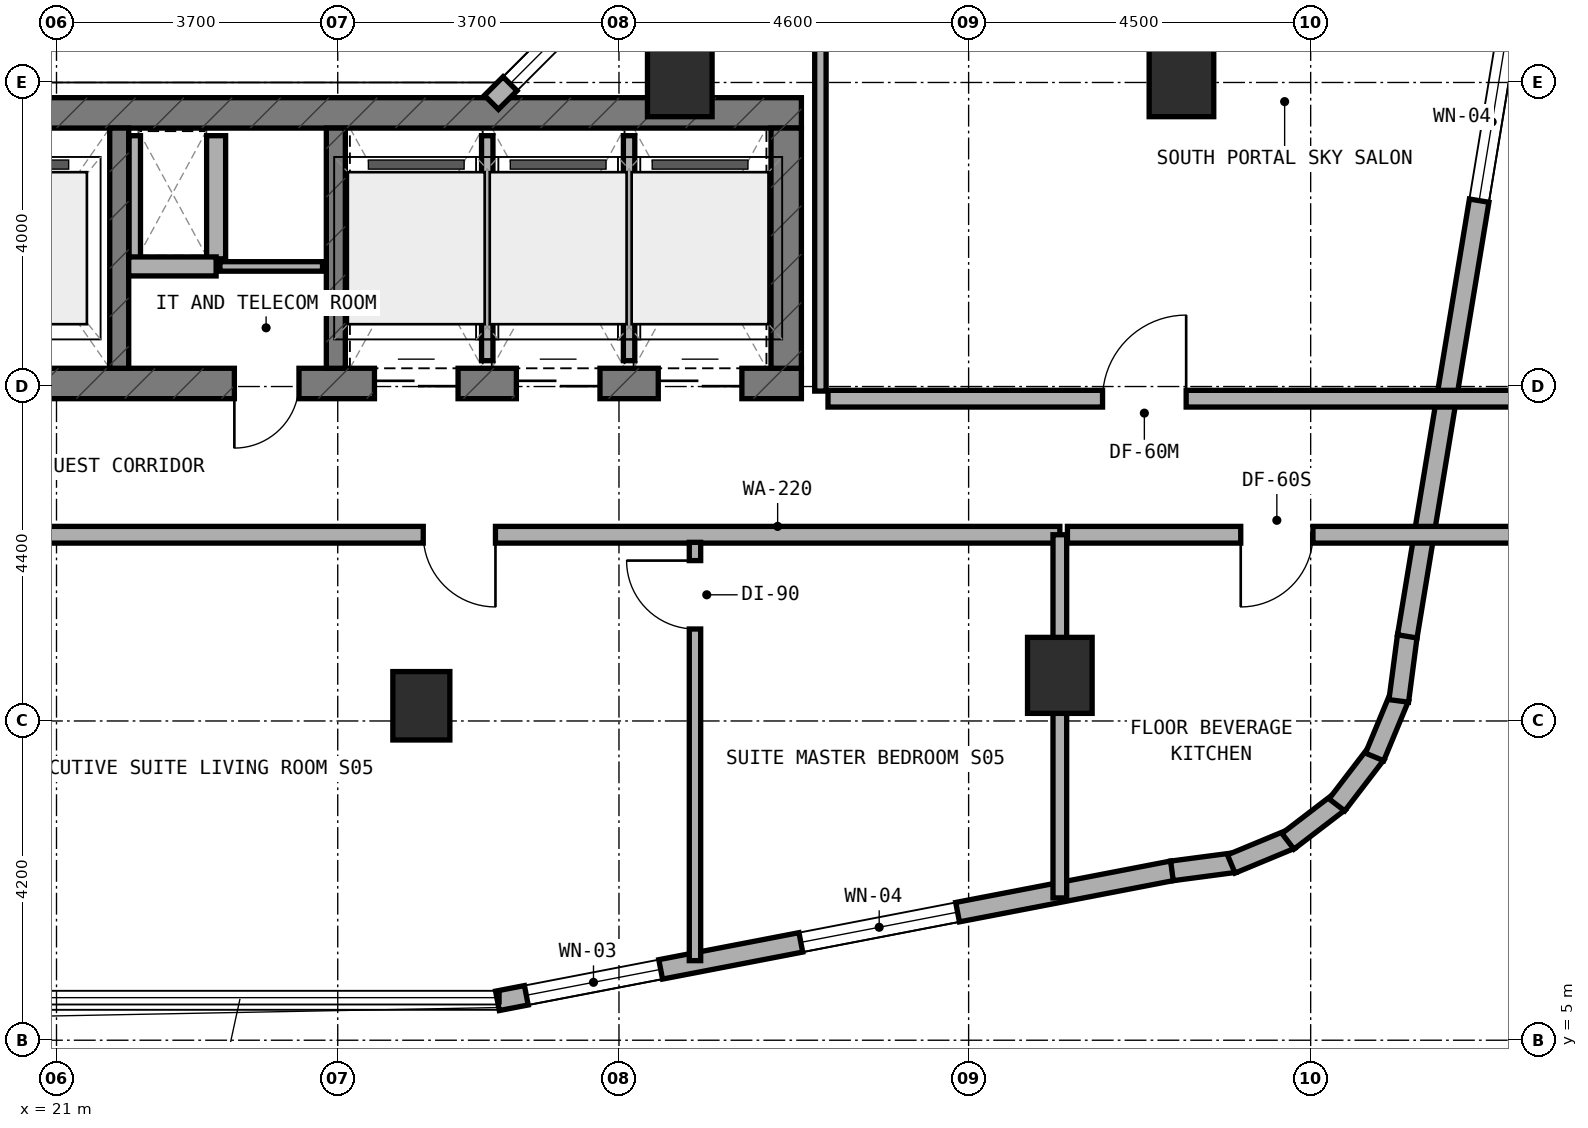
"""IFC4 building model, lengths in metres.
Left out: names, types, materials, properties, quantities, classifications, styles, units other than length and angle.
Written with IfcOpenShell. Run it as: python <this file> out.ifc"""

import sys

from ifc_helpers import new_model, si_unit, direction, frame, frame_2d, origin, origin_2d, place, context, subcontext, project, spatial, rectangle, extrude, element, fill, save


model = new_model("IFC4")
c1 = context("Model", 3, precision=1e-05, world=origin(), true_north=direction((0.0, 1.0)))
c2 = subcontext(c1, "Body", "Model", "MODEL_VIEW")
j1 = project(units=[si_unit("LENGTHUNIT", "METRE"), si_unit("PLANEANGLEUNIT", "RADIAN")], contexts=[c1])
p1 = place(None, origin())
s1 = spatial("IfcSite", under=j1, at=p1, CompositionType="ELEMENT")
p2 = place(p1, origin())
s2 = spatial("IfcBuilding", under=s1, at=p2, CompositionType="ELEMENT")
p3 = place(p2, frame((0.0, 0.0, 191.9)))
s3 = spatial("IfcBuildingStorey", under=s2, at=p3, CompositionType="ELEMENT", Elevation=191.9)
p4 = place(p3, frame((6.4, 13.64, 0.0), z_axis=(0.0, 0.0, 1.0), x_axis=(1.0, 0.0, 0.0)))
e1 = element("IfcWall", 1, at=p4, inside=s3, PredefinedType="SHEAR", context=c2, shape_type="SweptSolid", body=[
    extrude(rectangle(XDim=24.4, YDim=0.4, at=frame_2d((12.2, 0.0))), origin(), (0.0, 0.0, 1.0), 3.6),
])
p5 = place(p4, frame((9.15, 0.0, 0.0)))
e2 = element("IfcOpeningElement", 2, at=p5, cuts=e1, PredefinedType="OPENING", context=c2, shape_type="SweptSolid", body=[
    extrude(rectangle(XDim=1.2, YDim=2.15, at=frame_2d((0.6, 1.075))), frame((0.0, 0.21, 0.0), z_axis=(0.0, -1.0, 0.0), x_axis=(1.0, 0.0, 0.0)), (0.0, 0.0, 1.0), 0.42),
])
p6 = place(p4, frame((16.94, 0.0, 0.0)))
e3 = element("IfcOpeningElement", 3, at=p6, cuts=e1, PredefinedType="OPENING", context=c2, shape_type="SweptSolid", body=[
    extrude(rectangle(XDim=0.85, YDim=2.1, at=frame_2d((0.425, 1.05))), frame((0.0, 0.21, 0.0), z_axis=(0.0, -1.0, 0.0), x_axis=(1.0, 0.0, 0.0)), (0.0, 0.0, 1.0), 0.42),
])
p7 = place(p4, frame((18.783, 0.0, 0.0)))
e4 = element("IfcOpeningElement", 4, at=p7, cuts=e1, PredefinedType="OPENING", context=c2, shape_type="SweptSolid", body=[
    extrude(rectangle(XDim=1.1, YDim=2.15, at=frame_2d((0.55, 1.075))), frame((0.0, 0.21, 0.0), z_axis=(0.0, -1.0, 0.0), x_axis=(1.0, 0.0, 0.0)), (0.0, 0.0, 1.0), 0.42),
])
p8 = place(p4, frame((20.65, 0.0, 0.0)))
e5 = element("IfcOpeningElement", 5, at=p8, cuts=e1, PredefinedType="OPENING", context=c2, shape_type="SweptSolid", body=[
    extrude(rectangle(XDim=1.1, YDim=2.15, at=frame_2d((0.55, 1.075))), frame((0.0, 0.21, 0.0), z_axis=(0.0, -1.0, 0.0), x_axis=(1.0, 0.0, 0.0)), (0.0, 0.0, 1.0), 0.42),
])
p9 = place(p4, frame((22.517, 0.0, 0.0)))
e6 = element("IfcOpeningElement", 6, at=p9, cuts=e1, PredefinedType="OPENING", context=c2, shape_type="SweptSolid", body=[
    extrude(rectangle(XDim=1.1, YDim=2.15, at=frame_2d((0.55, 1.075))), frame((0.0, 0.21, 0.0), z_axis=(0.0, -1.0, 0.0), x_axis=(1.0, 0.0, 0.0)), (0.0, 0.0, 1.0), 0.42),
])
p10 = place(p3, frame((6.4, 17.2, 0.0), z_axis=(0.0, 0.0, 1.0), x_axis=(1.0, 0.0, 0.0)))
e7 = element("IfcWall", 7, at=p10, inside=s3, PredefinedType="SHEAR", context=c2, shape_type="SweptSolid", body=[
    extrude(rectangle(XDim=24.4, YDim=0.4, at=frame_2d((12.2, 0.0))), origin(), (0.0, 0.0, 1.0), 3.6),
])
p11 = place(p3, frame((30.6, 13.84, 0.0), z_axis=(0.0, 0.0, 1.0), x_axis=(0.0, 1.0, 0.0)))
e8 = element("IfcWall", 8, at=p11, inside=s3, PredefinedType="SHEAR", context=c2, shape_type="SweptSolid", body=[
    extrude(rectangle(XDim=3.16, YDim=0.4, at=frame_2d((1.58, 0.0))), origin(), (0.0, 0.0, 1.0), 3.6),
])
for number, where, z_axis, x_axis in (
    (9, (21.825, 13.84, 0.0), (0.0, 0.0, 1.0), (0.0, 1.0, 0.0)),
    (10, (24.675, 13.84, 0.0), (0.0, 0.0, 1.0), (0.0, 1.0, 0.0)),
):
    element("IfcWall", number, at=place(p3, frame(where, z_axis=z_axis, x_axis=x_axis)), inside=s3, PredefinedType="STANDARD", context=c2, shape_type="SweptSolid", body=[
        extrude(rectangle(XDim=3.16, YDim=0.25, at=frame_2d((1.58, 0.0))), origin(), (0.0, 0.0, 1.0), 3.32),
    ])
p12 = place(p3, frame((25.8, 9.4, 0.0), z_axis=(0.0, 0.0, 1.0), x_axis=(1.0, 0.0, 0.0)))
e11 = element("IfcColumn", 11, at=p12, inside=s3, PredefinedType="COLUMN", context=c2, shape_type="SweptSolid", body=[
    extrude(rectangle(XDim=0.75, YDim=0.9, at=origin_2d()), origin(), (0.0, 0.0, 1.0), 3.6),
])
for number, where, z_axis, x_axis in (
    (12, (34.2, 9.8, 0.0), (0.0, 0.0, 1.0), (1.0, 0.0, 0.0)),
    (13, (35.8, 17.65, 0.0), (0.0, 0.0, 1.0), (1.0, 0.0, 0.0)),
    (14, (29.2, 17.65, 0.0), (0.0, 0.0, 1.0), (1.0, 0.0, 0.0)),
):
    element("IfcColumn", number, at=place(p3, frame(where, z_axis=z_axis, x_axis=x_axis)), inside=s3, PredefinedType="COLUMN", context=c2, shape_type="SweptSolid", body=[
        extrude(rectangle(XDim=0.85, YDim=1.0, at=origin_2d()), origin(), (0.0, 0.0, 1.0), 3.6),
    ])
p13 = place(p3, frame((26.801, 5.518, 0.0), z_axis=(0.0, 0.0, 1.0), x_axis=(0.98192801022, 0.189254809039, 0.0)))
e15 = element("IfcWall", 15, at=p13, inside=s3, PredefinedType="STANDARD", context=c2, shape_type="SweptSolid", body=[
    extrude(rectangle(XDim=9.046, YDim=0.26, at=frame_2d((4.523, 0.0))), origin(), (0.0, 0.0, 1.0), 3.32),
])
p14 = place(p13, frame((0.387, 0.0, 0.85)))
e16 = element("IfcOpeningElement", 16, at=p14, cuts=e15, PredefinedType="OPENING", context=c2, shape_type="SweptSolid", body=[
    extrude(rectangle(XDim=1.8, YDim=1.5, at=frame_2d((0.9, 0.75))), frame((0.0, 0.14, 0.0), z_axis=(0.0, -1.0, 0.0), x_axis=(1.0, 0.0, 0.0)), (0.0, 0.0, 1.0), 0.28),
])
p15 = place(p13, frame((4.065, 0.0, 0.85)))
e17 = element("IfcOpeningElement", 17, at=p15, cuts=e15, PredefinedType="OPENING", context=c2, shape_type="SweptSolid", body=[
    extrude(rectangle(XDim=2.1, YDim=1.5, at=frame_2d((1.05, 0.75))), frame((0.0, 0.14, 0.0), z_axis=(0.0, -1.0, 0.0), x_axis=(1.0, 0.0, 0.0)), (0.0, 0.0, 1.0), 0.28),
])
p16 = place(p3, frame((35.675, 7.228, 0.0), z_axis=(0.0, 0.0, 1.0), x_axis=(0.99142134712, 0.130704676564, 0.0)))
e18 = element("IfcWall", 18, at=p16, inside=s3, PredefinedType="STANDARD", context=c2, shape_type="SweptSolid", body=[
    extrude(rectangle(XDim=0.833, YDim=0.26, at=frame_2d((0.417, 0.0))), origin(), (0.0, 0.0, 1.0), 3.32),
])
p17 = place(p3, frame((36.455, 7.319, 0.0), z_axis=(0.0, 0.0, 1.0), x_axis=(0.923712395518, 0.383086687796, 0.0)))
e19 = element("IfcWall", 19, at=p17, inside=s3, PredefinedType="STANDARD", context=c2, shape_type="SweptSolid", body=[
    extrude(rectangle(XDim=0.851, YDim=0.26, at=frame_2d((0.425, 0.0))), origin(), (0.0, 0.0, 1.0), 3.32),
])
for number, where, z_axis, x_axis in (
    (20, (37.201, 7.617, 0.0), (0.0, 0.0, 1.0), (0.794, 0.608, 0.0)),
    (21, (37.845, 8.096, 0.0), (0.0, 0.0, 1.0), (0.608, 0.794, 0.0)),
):
    element("IfcWall", number, at=place(p3, frame(where, z_axis=z_axis, x_axis=x_axis)), inside=s3, PredefinedType="STANDARD", context=c2, shape_type="SweptSolid", body=[
        extrude(rectangle(XDim=0.85, YDim=0.26, at=frame_2d((0.425, 0.0))), origin(), (0.0, 0.0, 1.0), 3.32),
    ])
p18 = place(p3, frame((38.341, 8.727, 0.0), z_axis=(0.0, 0.0, 1.0), x_axis=(0.383086687796, 0.923712395518, 0.0)))
e22 = element("IfcWall", 22, at=p18, inside=s3, PredefinedType="STANDARD", context=c2, shape_type="SweptSolid", body=[
    extrude(rectangle(XDim=0.851, YDim=0.26, at=frame_2d((0.425, 0.0))), origin(), (0.0, 0.0, 1.0), 3.32),
])
p19 = place(p3, frame((38.659, 9.464, 0.0), z_axis=(0.0, 0.0, 1.0), x_axis=(0.130192647656, 0.991488716273, 0.0)))
e23 = element("IfcWall", 23, at=p19, inside=s3, PredefinedType="STANDARD", context=c2, shape_type="SweptSolid", body=[
    extrude(rectangle(XDim=0.868, YDim=0.26, at=frame_2d((0.434, 0.0))), origin(), (0.0, 0.0, 1.0), 3.32),
])
p20 = place(p3, frame((38.771, 10.313, 0.0), z_axis=(0.0, 0.0, 1.0), x_axis=(0.16277908586, 0.986662540693, 0.0)))
e24 = element("IfcWall", 24, at=p20, inside=s3, PredefinedType="STANDARD", context=c2, shape_type="SweptSolid", body=[
    extrude(rectangle(XDim=10.437, YDim=0.26, at=frame_2d((5.219, 0.0))), origin(), (0.0, 0.0, 1.0), 3.32),
])
p21 = place(p20, frame((5.81, 0.0, 0.85)))
e25 = element("IfcOpeningElement", 25, at=p21, cuts=e24, PredefinedType="OPENING", context=c2, shape_type="SweptSolid", body=[
    extrude(rectangle(XDim=2.1, YDim=1.5, at=frame_2d((1.05, 0.75))), frame((0.0, 0.14, 0.0), z_axis=(0.0, -1.0, 0.0), x_axis=(1.0, 0.0, 0.0)), (0.0, 0.0, 1.0), 0.28),
])
p22 = place(p3, frame((28.485, 19.101, 0.0), z_axis=(0.0, 0.0, 1.0), x_axis=(-0.707106781187, -0.707106781187, 0.0)))
e26 = element("IfcWall", 26, at=p22, inside=s3, PredefinedType="STANDARD", context=c2, shape_type="SweptSolid", body=[
    extrude(rectangle(XDim=2.493, YDim=0.26, at=frame_2d((1.247, 0.0))), origin(), (0.0, 0.0, 1.0), 3.32),
])
p23 = place(p22, frame((0.347, 0.0, 0.85)))
e27 = element("IfcOpeningElement", 27, at=p23, cuts=e26, PredefinedType="OPENING", context=c2, shape_type="SweptSolid", body=[
    extrude(rectangle(XDim=1.8, YDim=1.5, at=frame_2d((0.9, 0.75))), frame((0.0, 0.14, 0.0), z_axis=(0.0, -1.0, 0.0), x_axis=(1.0, 0.0, 0.0)), (0.0, 0.0, 1.0), 0.28),
])
p24 = place(p3, frame((22.03, 15.28, 0.0), z_axis=(0.0, 0.0, 1.0), x_axis=(0.0, 1.0, 0.0)))
e28 = element("IfcWall", 28, at=p24, inside=s3, PredefinedType="PARTITIONING", context=c2, shape_type="SweptSolid", body=[
    extrude(rectangle(XDim=1.62, YDim=0.15, at=frame_2d((0.81, 0.0))), origin(), (0.0, 0.0, 1.0), 3.32),
])
p25 = place(p3, frame((23.1, 15.28, 0.0), z_axis=(0.0, 0.0, 1.0), x_axis=(0.0, 1.0, 0.0)))
e29 = element("IfcWall", 29, at=p25, inside=s3, PredefinedType="SOLIDWALL", context=c2, shape_type="SweptSolid", body=[
    extrude(rectangle(XDim=1.62, YDim=0.25, at=frame_2d((0.81, 0.0))), origin(), (0.0, 0.0, 1.0), 3.32),
])
p26 = place(p3, frame((21.95, 15.18, 0.0), z_axis=(0.0, 0.0, 1.0), x_axis=(1.0, 0.0, 0.0)))
e30 = element("IfcWall", 30, at=p26, inside=s3, PredefinedType="SOLIDWALL", context=c2, shape_type="SweptSolid", body=[
    extrude(rectangle(XDim=1.15, YDim=0.25, at=frame_2d((0.575, 0.0))), origin(), (0.0, 0.0, 1.0), 3.32),
])
p27 = place(p3, frame((23.15, 15.18, 0.0), z_axis=(0.0, 0.0, 1.0), x_axis=(1.0, 0.0, 0.0)))
e31 = element("IfcWall", 31, at=p27, inside=s3, PredefinedType="PARTITIONING", context=c2, shape_type="SweptSolid", body=[
    extrude(rectangle(XDim=1.35, YDim=0.125, at=frame_2d((0.675, 0.0))), origin(), (0.0, 0.0, 1.0), 3.32),
])
p28 = place(p3, frame((26.667, 13.94, 0.0), z_axis=(0.0, 0.0, 1.0), x_axis=(0.0, 1.0, 0.0)))
e32 = element("IfcWall", 32, at=p28, inside=s3, PredefinedType="PARTITIONING", context=c2, shape_type="SweptSolid", body=[
    extrude(rectangle(XDim=2.96, YDim=0.15, at=frame_2d((1.48, 0.0))), origin(), (0.0, 0.0, 1.0), 3.32),
])
p29 = place(p3, frame((28.533, 13.94, 0.0), z_axis=(0.0, 0.0, 1.0), x_axis=(0.0, 1.0, 0.0)))
e33 = element("IfcWall", 33, at=p29, inside=s3, PredefinedType="PARTITIONING", context=c2, shape_type="SweptSolid", body=[
    extrude(rectangle(XDim=2.96, YDim=0.15, at=frame_2d((1.48, 0.0))), origin(), (0.0, 0.0, 1.0), 2.995),
])
p30 = place(p3, frame((18.4, 11.65, 0.0), z_axis=(0.0, 0.0, 1.0), x_axis=(1.0, 0.0, 0.0)))
e34 = element("IfcWall", 34, at=p30, inside=s3, PredefinedType="SOLIDWALL", context=c2, shape_type="SweptSolid", body=[
    extrude(rectangle(XDim=15.8, YDim=0.22, at=frame_2d((7.9, 0.0))), origin(), (0.0, 0.0, 1.0), 2.995),
])
p31 = place(p30, frame((7.425, 0.0, 0.0)))
e35 = element("IfcOpeningElement", 35, at=p31, cuts=e34, PredefinedType="OPENING", context=c2, shape_type="SweptSolid", body=[
    extrude(rectangle(XDim=0.95, YDim=2.1, at=frame_2d((0.475, 1.05))), frame((0.0, 0.12, 0.0), z_axis=(0.0, -1.0, 0.0), x_axis=(1.0, 0.0, 0.0)), (0.0, 0.0, 1.0), 0.24),
])
p32 = place(p3, frame((29.4, 6.047, 0.0), z_axis=(0.0, 0.0, 1.0), x_axis=(0.0, 1.0, 0.0)))
e36 = element("IfcWall", 36, at=p32, inside=s3, PredefinedType="PARTITIONING", context=c2, shape_type="SweptSolid", body=[
    extrude(rectangle(XDim=5.503, YDim=0.15, at=frame_2d((2.751, 0.0))), origin(), (0.0, 0.0, 1.0), 2.935),
])
p33 = place(p32, frame((4.363, 0.0, 0.0)))
e37 = element("IfcOpeningElement", 37, at=p33, cuts=e36, PredefinedType="OPENING", context=c2, shape_type="SweptSolid", body=[
    extrude(rectangle(XDim=0.9, YDim=2.1, at=frame_2d((0.45, 1.05))), frame((0.0, 0.085, 0.0), z_axis=(0.0, -1.0, 0.0), x_axis=(1.0, 0.0, 0.0)), (0.0, 0.0, 1.0), 0.17),
])
p34 = place(p3, frame((34.2, 6.872, 0.0), z_axis=(0.0, 0.0, 1.0), x_axis=(0.0, 1.0, 0.0)))
e38 = element("IfcWall", 38, at=p34, inside=s3, PredefinedType="SOLIDWALL", context=c2, shape_type="SweptSolid", body=[
    extrude(rectangle(XDim=4.778, YDim=0.18, at=frame_2d((2.389, 0.0))), origin(), (0.0, 0.0, 1.0), 2.935),
])
p35 = place(p3, frame((34.3, 11.65, 0.0), z_axis=(0.0, 0.0, 1.0), x_axis=(1.0, 0.0, 0.0)))
e39 = element("IfcWall", 39, at=p35, inside=s3, PredefinedType="SOLIDWALL", context=c2, shape_type="SweptSolid", body=[
    extrude(rectangle(XDim=6.04, YDim=0.22, at=frame_2d((3.02, 0.0))), origin(), (0.0, 0.0, 1.0), 2.935),
])
p36 = place(p35, frame((2.28, 0.0, 0.0)))
e40 = element("IfcOpeningElement", 40, at=p36, cuts=e39, PredefinedType="OPENING", context=c2, shape_type="SweptSolid", body=[
    extrude(rectangle(XDim=0.95, YDim=2.1, at=frame_2d((0.475, 1.05))), frame((0.0, 0.12, 0.0), z_axis=(0.0, -1.0, 0.0), x_axis=(1.0, 0.0, 0.0)), (0.0, 0.0, 1.0), 0.24),
])
p37 = place(p3, frame((31.05, 13.54, 0.0), z_axis=(0.0, 0.0, 1.0), x_axis=(0.0, 1.0, 0.0)))
e41 = element("IfcWall", 41, at=p37, inside=s3, PredefinedType="PARTITIONING", context=c2, shape_type="SweptSolid", body=[
    extrude(rectangle(XDim=6.66, YDim=0.15, at=frame_2d((3.33, 0.0))), origin(), (0.0, 0.0, 1.0), 2.995),
])
p38 = place(p3, frame((31.15, 13.44, 0.0), z_axis=(0.0, 0.0, 1.0), x_axis=(1.0, 0.0, 0.0)))
e42 = element("IfcWall", 42, at=p38, inside=s3, PredefinedType="SOLIDWALL", context=c2, shape_type="SweptSolid", body=[
    extrude(rectangle(XDim=9.15, YDim=0.22, at=frame_2d((4.575, 0.0))), origin(), (0.0, 0.0, 1.0), 2.935),
])
p39 = place(p38, frame((3.612, 0.0, 0.0)))
e43 = element("IfcOpeningElement", 43, at=p39, cuts=e42, PredefinedType="OPENING", context=c2, shape_type="SweptSolid", body=[
    extrude(rectangle(XDim=1.1, YDim=2.1, at=frame_2d((0.55, 1.05))), frame((0.0, 0.12, 0.0), z_axis=(0.0, -1.0, 0.0), x_axis=(1.0, 0.0, 0.0)), (0.0, 0.0, 1.0), 0.24),
])
p40 = place(p14, origin())
e44 = element("IfcWindow", 44, at=p40, inside=s3, PartitioningType="SINGLE_PANEL", PredefinedType="WINDOW", context=c2, shape_type="SweptSolid", body=[
    extrude(rectangle(XDim=1.8, YDim=1.5, at=frame_2d((0.9, 0.75))), frame((0.0, 0.03, 0.0), z_axis=(0.0, -1.0, 0.0), x_axis=(1.0, 0.0, 0.0)), (0.0, 0.0, 1.0), 0.06),
])
fill(e16, e44)
p41 = place(p15, origin())
e45 = element("IfcWindow", 45, at=p41, inside=s3, PartitioningType="SINGLE_PANEL", PredefinedType="WINDOW", context=c2, shape_type="SweptSolid", body=[
    extrude(rectangle(XDim=2.1, YDim=1.5, at=frame_2d((1.05, 0.75))), frame((0.0, 0.03, 0.0), z_axis=(0.0, -1.0, 0.0), x_axis=(1.0, 0.0, 0.0)), (0.0, 0.0, 1.0), 0.06),
])
fill(e17, e45)
p42 = place(p21, origin())
e46 = element("IfcWindow", 46, at=p42, inside=s3, PartitioningType="SINGLE_PANEL", PredefinedType="WINDOW", context=c2, shape_type="SweptSolid", body=[
    extrude(rectangle(XDim=2.1, YDim=1.5, at=frame_2d((1.05, 0.75))), frame((0.0, 0.03, 0.0), z_axis=(0.0, -1.0, 0.0), x_axis=(1.0, 0.0, 0.0)), (0.0, 0.0, 1.0), 0.06),
])
fill(e25, e46)
p43 = place(p23, origin())
e47 = element("IfcWindow", 47, at=p43, inside=s3, PartitioningType="SINGLE_PANEL", PredefinedType="WINDOW", context=c2, shape_type="SweptSolid", body=[
    extrude(rectangle(XDim=1.8, YDim=1.5, at=frame_2d((0.9, 0.75))), frame((0.0, 0.03, 0.0), z_axis=(0.0, -1.0, 0.0), x_axis=(1.0, 0.0, 0.0)), (0.0, 0.0, 1.0), 0.06),
])
fill(e27, e47)
p44 = place(p6, frame((0.85, 0.0, 0.0), z_axis=(0.0, 0.0, 1.0), x_axis=(-1.0, 0.0, 0.0)))
e48 = element("IfcDoor", 48, at=p44, inside=s3, OperationType="SINGLE_SWING_RIGHT", PredefinedType="DOOR", context=c2, shape_type="SweptSolid", body=[
    extrude(rectangle(XDim=0.85, YDim=2.1, at=frame_2d((0.425, 1.05))), frame((0.0, 0.025, 0.0), z_axis=(0.0, -1.0, 0.0), x_axis=(1.0, 0.0, 0.0)), (0.0, 0.0, 1.0), 0.05),
])
fill(e3, e48)
p45 = place(p7, frame((1.1, 0.0, 0.0), z_axis=(0.0, 0.0, 1.0), x_axis=(-1.0, 0.0, 0.0)))
e49 = element("IfcDoor", 49, at=p45, inside=s3, OperationType="DOUBLE_DOOR_SLIDING", PredefinedType="DOOR", context=c2, shape_type="SweptSolid", body=[
    extrude(rectangle(XDim=1.1, YDim=2.15, at=frame_2d((0.55, 1.075))), frame((0.0, 0.025, 0.0), z_axis=(0.0, -1.0, 0.0), x_axis=(1.0, 0.0, 0.0)), (0.0, 0.0, 1.0), 0.05),
])
fill(e4, e49)
p46 = place(p8, frame((1.1, 0.0, 0.0), z_axis=(0.0, 0.0, 1.0), x_axis=(-1.0, 0.0, 0.0)))
e50 = element("IfcDoor", 50, at=p46, inside=s3, OperationType="DOUBLE_DOOR_SLIDING", PredefinedType="DOOR", context=c2, shape_type="SweptSolid", body=[
    extrude(rectangle(XDim=1.1, YDim=2.15, at=frame_2d((0.55, 1.075))), frame((0.0, 0.025, 0.0), z_axis=(0.0, -1.0, 0.0), x_axis=(1.0, 0.0, 0.0)), (0.0, 0.0, 1.0), 0.05),
])
fill(e5, e50)
p47 = place(p9, frame((1.1, 0.0, 0.0), z_axis=(0.0, 0.0, 1.0), x_axis=(-1.0, 0.0, 0.0)))
e51 = element("IfcDoor", 51, at=p47, inside=s3, OperationType="DOUBLE_DOOR_SLIDING", PredefinedType="DOOR", context=c2, shape_type="SweptSolid", body=[
    extrude(rectangle(XDim=1.1, YDim=2.15, at=frame_2d((0.55, 1.075))), frame((0.0, 0.025, 0.0), z_axis=(0.0, -1.0, 0.0), x_axis=(1.0, 0.0, 0.0)), (0.0, 0.0, 1.0), 0.05),
])
fill(e6, e51)
p48 = place(p31, frame((0.95, 0.0, 0.0), z_axis=(0.0, 0.0, 1.0), x_axis=(-1.0, 0.0, 0.0)))
e52 = element("IfcDoor", 52, at=p48, inside=s3, OperationType="SINGLE_SWING_LEFT", PredefinedType="DOOR", context=c2, shape_type="SweptSolid", body=[
    extrude(rectangle(XDim=0.95, YDim=2.1, at=frame_2d((0.475, 1.05))), frame((0.0, 0.025, 0.0), z_axis=(0.0, -1.0, 0.0), x_axis=(1.0, 0.0, 0.0)), (0.0, 0.0, 1.0), 0.05),
])
fill(e35, e52)
p49 = place(p33, origin())
e53 = element("IfcDoor", 53, at=p49, inside=s3, OperationType="SINGLE_SWING_RIGHT", PredefinedType="DOOR", context=c2, shape_type="SweptSolid", body=[
    extrude(rectangle(XDim=0.9, YDim=2.1, at=frame_2d((0.45, 1.05))), frame((0.0, 0.025, 0.0), z_axis=(0.0, -1.0, 0.0), x_axis=(1.0, 0.0, 0.0)), (0.0, 0.0, 1.0), 0.05),
])
fill(e37, e53)
p50 = place(p36, frame((0.95, 0.0, 0.0), z_axis=(0.0, 0.0, 1.0), x_axis=(-1.0, 0.0, 0.0)))
e54 = element("IfcDoor", 54, at=p50, inside=s3, OperationType="SINGLE_SWING_RIGHT", PredefinedType="DOOR", context=c2, shape_type="SweptSolid", body=[
    extrude(rectangle(XDim=0.95, YDim=2.1, at=frame_2d((0.475, 1.05))), frame((0.0, 0.025, 0.0), z_axis=(0.0, -1.0, 0.0), x_axis=(1.0, 0.0, 0.0)), (0.0, 0.0, 1.0), 0.05),
])
fill(e40, e54)
p51 = place(p39, origin())
e55 = element("IfcDoor", 55, at=p51, inside=s3, OperationType="SINGLE_SWING_RIGHT", PredefinedType="DOOR", context=c2, shape_type="SweptSolid", body=[
    extrude(rectangle(XDim=1.1, YDim=2.1, at=frame_2d((0.55, 1.05))), frame((0.0, 0.025, 0.0), z_axis=(0.0, -1.0, 0.0), x_axis=(1.0, 0.0, 0.0)), (0.0, 0.0, 1.0), 0.05),
])
fill(e43, e55)
save(model, sys.argv[1])
